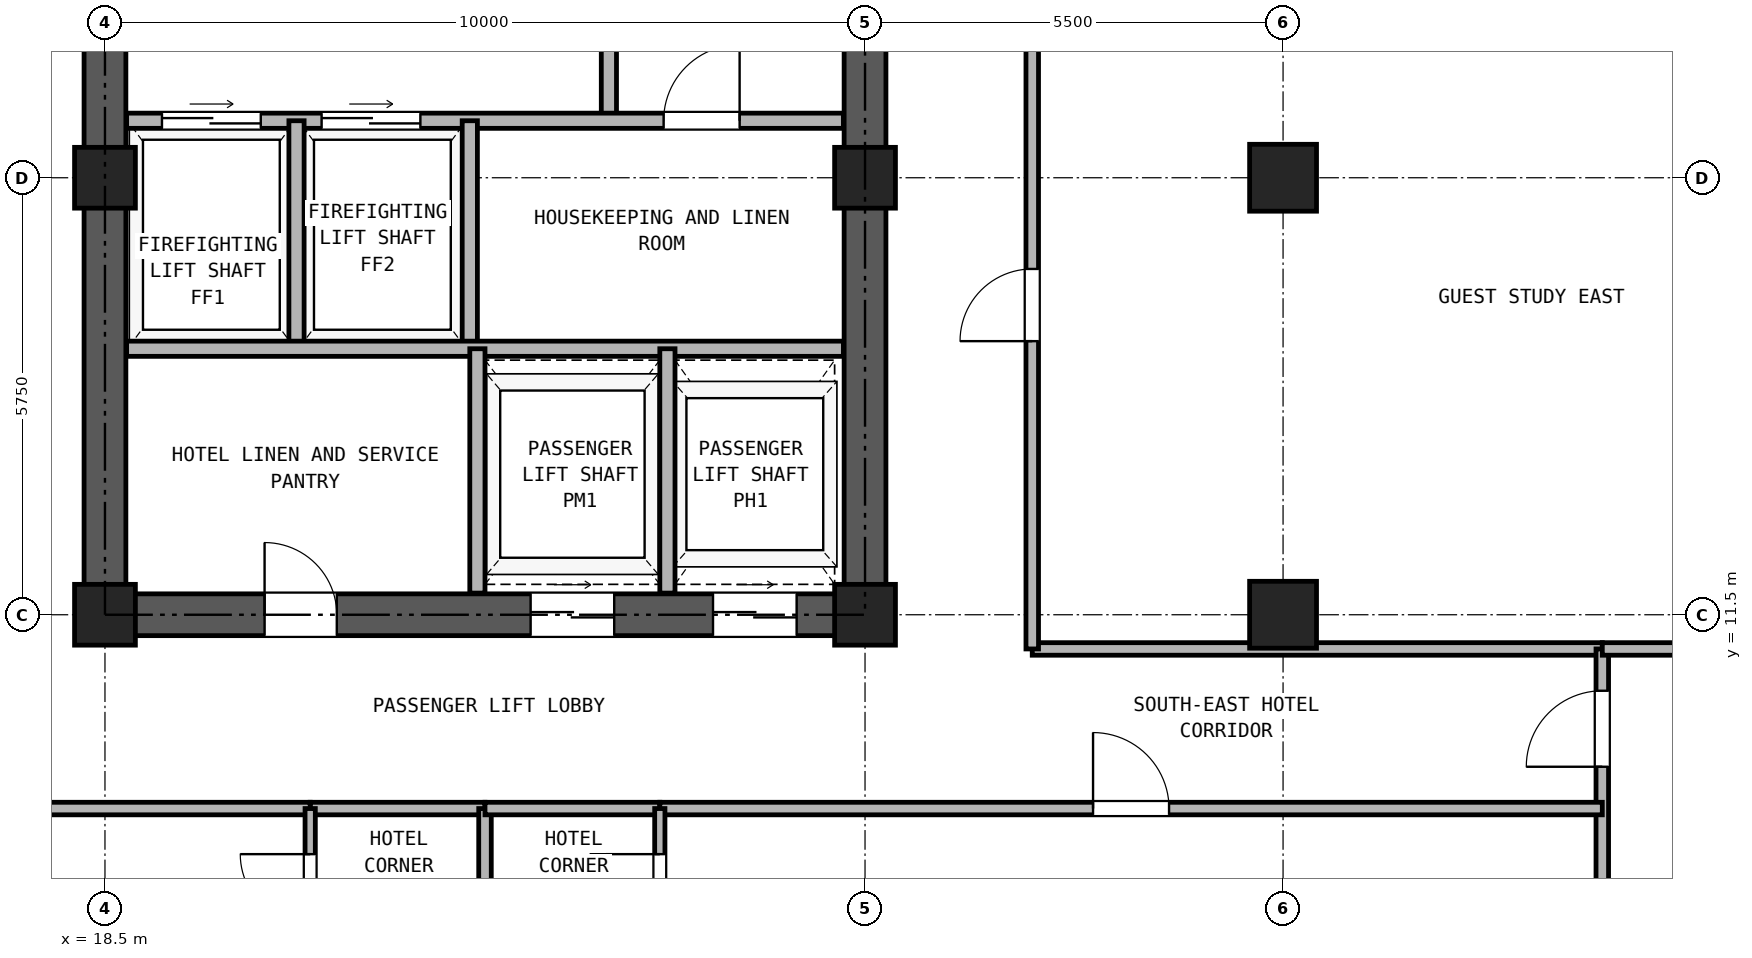
"""IFC4 building model, lengths in metres.
Left out: names, types, materials, properties, quantities, classifications, styles, units other than length and angle.
Written with IfcOpenShell. Run it as: python <this file> out.ifc"""

import sys

from ifc_helpers import new_model, si_unit, direction, frame, frame_2d, origin, origin_2d, place, context, subcontext, project, spatial, rectangle, hollow_rectangle, extrude, source, transform, mapped, element, fill, save


model = new_model("IFC4")
c1 = context("Model", 3, precision=1e-05, world=origin(), true_north=direction((0.0, 1.0)))
c2 = subcontext(c1, "Body", "Model", "MODEL_VIEW")
j1 = project(units=[si_unit("LENGTHUNIT", "METRE"), si_unit("PLANEANGLEUNIT", "RADIAN")], contexts=[c1])
p1 = place(None, origin())
s1 = spatial("IfcSite", under=j1, at=p1, CompositionType="ELEMENT")
p2 = place(p1, origin())
s2 = spatial("IfcBuilding", under=s1, at=p2, CompositionType="ELEMENT")
p3 = place(p2, frame((0.0, 0.0, 137.5)))
s3 = spatial("IfcBuildingStorey", under=s2, at=p3, CompositionType="ELEMENT", Elevation=137.5)
m1 = source(origin(), c2, "Body", "SweptSolid", [
    extrude(hollow_rectangle(XDim=0.8, YDim=0.8, WallThickness=0.045, at=origin_2d()), origin(), (0.0, 0.0, 1.0), 2.95),
])
for number, where, z_axis, x_axis in (
    (1, (18.5, 11.5, 0.0), (0.0, 0.0, 1.0), (1.0, 0.0, 0.0)),
    (2, (18.5, 17.25, 0.0), (0.0, 0.0, 1.0), (1.0, 0.0, 0.0)),
    (3, (28.5, 11.5, 0.0), (0.0, 0.0, 1.0), (1.0, 0.0, 0.0)),
    (4, (28.5, 17.25, 0.0), (0.0, 0.0, 1.0), (1.0, 0.0, 0.0)),
):
    element("IfcColumn", number, at=place(p3, frame(where, z_axis=z_axis, x_axis=x_axis)), inside=s3, PredefinedType="COLUMN", context=c2, shape_type="MappedRepresentation", body=[
        mapped(m1, transform((0.0, 0.0, 0.0), x_axis=(1.0, 0.0, 0.0), y_axis=(0.0, 1.0, 0.0), z_axis=(0.0, 0.0, 1.0), scale=1.0)),
    ])
m2 = source(origin(), c2, "Body", "SweptSolid", [
    extrude(hollow_rectangle(XDim=0.88, YDim=0.88, WallThickness=0.05, at=origin_2d()), origin(), (0.0, 0.0, 1.0), 2.95),
])
for number, where, z_axis, x_axis in (
    (5, (34.0, 11.5, 0.0), (0.0, 0.0, 1.0), (1.0, 0.0, 0.0)),
    (6, (34.0, 17.25, 0.0), (0.0, 0.0, 1.0), (1.0, 0.0, 0.0)),
):
    element("IfcColumn", number, at=place(p3, frame(where, z_axis=z_axis, x_axis=x_axis)), inside=s3, PredefinedType="COLUMN", context=c2, shape_type="MappedRepresentation", body=[
        mapped(m2, transform((0.0, 0.0, 0.0), x_axis=(1.0, 0.0, 0.0), y_axis=(0.0, 1.0, 0.0), z_axis=(0.0, 0.0, 1.0), scale=1.0)),
    ])
p4 = place(p3, frame((18.225, 11.5, 0.0), z_axis=(0.0, 0.0, 1.0), x_axis=(1.0, 0.0, 0.0)))
e7 = element("IfcWall", 7, at=p4, inside=s3, PredefinedType="SHEAR", context=c2, shape_type="SweptSolid", body=[
    extrude(rectangle(XDim=10.55, YDim=0.55, at=frame_2d((5.275, 0.0))), origin(), (0.0, 0.0, 1.0), 2.95),
])
p5 = place(p4, frame((2.375, 0.0, 0.0)))
e8 = element("IfcOpeningElement", 8, at=p5, cuts=e7, PredefinedType="OPENING", context=c2, shape_type="SweptSolid", body=[
    extrude(rectangle(XDim=0.95, YDim=2.15, at=frame_2d((0.475, 1.075))), frame((0.0, 0.285, 0.0), z_axis=(0.0, -1.0, 0.0), x_axis=(1.0, 0.0, 0.0)), (0.0, 0.0, 1.0), 0.57),
])
p6 = place(p4, frame((5.875, 0.0, 0.0)))
e9 = element("IfcOpeningElement", 9, at=p6, cuts=e7, PredefinedType="OPENING", context=c2, shape_type="SweptSolid", body=[
    extrude(rectangle(XDim=1.1, YDim=2.25, at=frame_2d((0.55, 1.125))), frame((0.0, 0.285, 0.0), z_axis=(0.0, -1.0, 0.0), x_axis=(1.0, 0.0, 0.0)), (0.0, 0.0, 1.0), 0.57),
])
p7 = place(p4, frame((8.275, 0.0, 0.0)))
e10 = element("IfcOpeningElement", 10, at=p7, cuts=e7, PredefinedType="OPENING", context=c2, shape_type="SweptSolid", body=[
    extrude(rectangle(XDim=1.1, YDim=2.25, at=frame_2d((0.55, 1.125))), frame((0.0, 0.285, 0.0), z_axis=(0.0, -1.0, 0.0), x_axis=(1.0, 0.0, 0.0)), (0.0, 0.0, 1.0), 0.57),
])
p8 = place(p3, frame((18.5, 11.775, 0.0), z_axis=(0.0, 0.0, 1.0), x_axis=(0.0, 1.0, 0.0)))
e11 = element("IfcWall", 11, at=p8, inside=s3, PredefinedType="SHEAR", context=c2, shape_type="SweptSolid", body=[
    extrude(rectangle(XDim=16.7, YDim=0.55, at=frame_2d((8.35, 0.0))), origin(), (0.0, 0.0, 1.0), 2.95),
])
p9 = place(p8, frame((7.375, 0.0, 0.0)))
e12 = element("IfcOpeningElement", 12, at=p9, cuts=e11, PredefinedType="OPENING", context=c2, shape_type="SweptSolid", body=[
    extrude(rectangle(XDim=1.15, YDim=2.2, at=frame_2d((0.575, 1.1))), frame((0.0, 0.285, 0.0), z_axis=(0.0, -1.0, 0.0), x_axis=(1.0, 0.0, 0.0)), (0.0, 0.0, 1.0), 0.57),
])
p10 = place(p3, frame((28.5, 11.775, 0.0), z_axis=(0.0, 0.0, 1.0), x_axis=(0.0, 1.0, 0.0)))
e13 = element("IfcWall", 13, at=p10, inside=s3, PredefinedType="SHEAR", context=c2, shape_type="SweptSolid", body=[
    extrude(rectangle(XDim=16.7, YDim=0.55, at=frame_2d((8.35, 0.0))), origin(), (0.0, 0.0, 1.0), 2.95),
])
p11 = place(p10, frame((7.375, 0.0, 0.0)))
e14 = element("IfcOpeningElement", 14, at=p11, cuts=e13, PredefinedType="OPENING", context=c2, shape_type="SweptSolid", body=[
    extrude(rectangle(XDim=1.15, YDim=2.2, at=frame_2d((0.575, 1.1))), frame((0.0, 0.285, 0.0), z_axis=(0.0, -1.0, 0.0), x_axis=(1.0, 0.0, 0.0)), (0.0, 0.0, 1.0), 0.57),
])
p12 = place(p3, frame((25.13, 18.0, 0.0), z_axis=(0.0, 0.0, 1.0), x_axis=(0.0, 1.0, 0.0)))
e15 = element("IfcWall", 15, at=p12, inside=s3, PredefinedType="PARTITIONING", context=c2, shape_type="SweptSolid", body=[
    extrude(rectangle(XDim=3.39, YDim=0.2, at=frame_2d((1.695, 0.0))), origin(), (0.0, 0.0, 1.0), 2.95),
])
p13 = place(p12, frame((1.1, 0.0, 0.0)))
e16 = element("IfcOpeningElement", 16, at=p13, cuts=e15, PredefinedType="OPENING", context=c2, shape_type="SweptSolid", body=[
    extrude(rectangle(XDim=1.15, YDim=2.2, at=frame_2d((0.575, 1.1))), frame((0.0, 0.11, 0.0), z_axis=(0.0, -1.0, 0.0), x_axis=(1.0, 0.0, 0.0)), (0.0, 0.0, 1.0), 0.22),
])
p14 = place(p3, frame((18.785, 18.0, 0.0), z_axis=(0.0, 0.0, 1.0), x_axis=(1.0, 0.0, 0.0)))
e17 = element("IfcWall", 17, at=p14, inside=s3, PredefinedType="PARTITIONING", context=c2, shape_type="SweptSolid", body=[
    extrude(rectangle(XDim=9.43, YDim=0.2, at=frame_2d((4.715, 0.0))), origin(), (0.0, 0.0, 1.0), 2.95),
])
p15 = place(p14, frame((0.465, 0.0, 0.0)))
e18 = element("IfcOpeningElement", 18, at=p15, cuts=e17, PredefinedType="OPENING", context=c2, shape_type="SweptSolid", body=[
    extrude(rectangle(XDim=1.3, YDim=2.3, at=frame_2d((0.65, 1.15))), frame((0.0, 0.11, 0.0), z_axis=(0.0, -1.0, 0.0), x_axis=(1.0, 0.0, 0.0)), (0.0, 0.0, 1.0), 0.22),
])
p16 = place(p14, frame((2.565, 0.0, 0.0)))
e19 = element("IfcOpeningElement", 19, at=p16, cuts=e17, PredefinedType="OPENING", context=c2, shape_type="SweptSolid", body=[
    extrude(rectangle(XDim=1.3, YDim=2.3, at=frame_2d((0.65, 1.15))), frame((0.0, 0.11, 0.0), z_axis=(0.0, -1.0, 0.0), x_axis=(1.0, 0.0, 0.0)), (0.0, 0.0, 1.0), 0.22),
])
p17 = place(p14, frame((7.065, 0.0, 0.0)))
e20 = element("IfcOpeningElement", 20, at=p17, cuts=e17, PredefinedType="OPENING", context=c2, shape_type="SweptSolid", body=[
    extrude(rectangle(XDim=1.0, YDim=2.15, at=frame_2d((0.5, 1.075))), frame((0.0, 0.11, 0.0), z_axis=(0.0, -1.0, 0.0), x_axis=(1.0, 0.0, 0.0)), (0.0, 0.0, 1.0), 0.22),
])
for number, where, z_axis, x_axis in (
    (21, (21.02, 15.0, 0.0), (0.0, 0.0, 1.0), (0.0, 1.0, 0.0)),
    (22, (23.3, 15.0, 0.0), (0.0, 0.0, 1.0), (0.0, 1.0, 0.0)),
):
    element("IfcWall", number, at=place(p3, frame(where, z_axis=z_axis, x_axis=x_axis)), inside=s3, PredefinedType="PARTITIONING", context=c2, shape_type="SweptSolid", body=[
        extrude(rectangle(XDim=3.0, YDim=0.2, at=frame_2d((1.5, 0.0))), origin(), (0.0, 0.0, 1.0), 2.95),
    ])
p18 = place(p3, frame((18.785, 15.0, 0.0), z_axis=(0.0, 0.0, 1.0), x_axis=(1.0, 0.0, 0.0)))
e23 = element("IfcWall", 23, at=p18, inside=s3, PredefinedType="PARTITIONING", context=c2, shape_type="SweptSolid", body=[
    extrude(rectangle(XDim=9.43, YDim=0.2, at=frame_2d((4.715, 0.0))), origin(), (0.0, 0.0, 1.0), 2.95),
])
for number, where, z_axis, x_axis in (
    (24, (23.4, 11.785, 0.0), (0.0, 0.0, 1.0), (0.0, 1.0, 0.0)),
    (25, (25.9, 11.785, 0.0), (0.0, 0.0, 1.0), (0.0, 1.0, 0.0)),
):
    element("IfcWall", number, at=place(p3, frame(where, z_axis=z_axis, x_axis=x_axis)), inside=s3, PredefinedType="PARTITIONING", context=c2, shape_type="SweptSolid", body=[
        extrude(rectangle(XDim=3.215, YDim=0.2, at=frame_2d((1.607, 0.0))), origin(), (0.0, 0.0, 1.0), 2.95),
    ])
p19 = place(p3, frame((30.7, 11.05, 0.0), z_axis=(0.0, 0.0, 1.0), x_axis=(1.0, 0.0, 0.0)))
e26 = element("IfcWall", 26, at=p19, inside=s3, PredefinedType="PARTITIONING", context=c2, shape_type="SweptSolid", body=[
    extrude(rectangle(XDim=7.5, YDim=0.165, at=frame_2d((3.75, 0.0))), origin(), (0.0, 0.0, 1.0), 2.95),
])
p20 = place(p3, frame((30.7, 11.05, 0.0), z_axis=(0.0, 0.0, 1.0), x_axis=(0.0, 1.0, 0.0)))
e27 = element("IfcWall", 27, at=p20, inside=s3, PredefinedType="PARTITIONING", context=c2, shape_type="SweptSolid", body=[
    extrude(rectangle(XDim=18.2, YDim=0.165, at=frame_2d((9.1, 0.0))), origin(), (0.0, 0.0, 1.0), 2.95),
])
p21 = place(p20, frame((4.05, 0.0, 0.0)))
e28 = element("IfcOpeningElement", 28, at=p21, cuts=e27, PredefinedType="OPENING", context=c2, shape_type="SweptSolid", body=[
    extrude(rectangle(XDim=0.95, YDim=2.15, at=frame_2d((0.475, 1.075))), frame((0.0, 0.093, 0.0), z_axis=(0.0, -1.0, 0.0), x_axis=(1.0, 0.0, 0.0)), (0.0, 0.0, 1.0), 0.185),
])
p22 = place(p20, frame((13.15, 0.0, 0.0)))
e29 = element("IfcOpeningElement", 29, at=p22, cuts=e27, PredefinedType="OPENING", context=c2, shape_type="SweptSolid", body=[
    extrude(rectangle(XDim=0.95, YDim=2.15, at=frame_2d((0.475, 1.075))), frame((0.0, 0.093, 0.0), z_axis=(0.0, -1.0, 0.0), x_axis=(1.0, 0.0, 0.0)), (0.0, 0.0, 1.0), 0.185),
])
p23 = place(p3, frame((38.2, 0.16, 0.0), z_axis=(0.0, 0.0, 1.0), x_axis=(0.0, 1.0, 0.0)))
e30 = element("IfcWall", 30, at=p23, inside=s3, PredefinedType="PARTITIONING", context=c2, shape_type="SweptSolid", body=[
    extrude(rectangle(XDim=10.89, YDim=0.165, at=frame_2d((5.445, 0.0))), origin(), (0.0, 0.0, 1.0), 2.95),
])
p24 = place(p23, frame((9.34, 0.0, 0.0)))
e31 = element("IfcOpeningElement", 31, at=p24, cuts=e30, PredefinedType="OPENING", context=c2, shape_type="SweptSolid", body=[
    extrude(rectangle(XDim=1.0, YDim=2.15, at=frame_2d((0.5, 1.075))), frame((0.0, 0.093, 0.0), z_axis=(0.0, -1.0, 0.0), x_axis=(1.0, 0.0, 0.0)), (0.0, 0.0, 1.0), 0.185),
])
p25 = place(p3, frame((38.2, 11.05, 0.0), z_axis=(0.0, 0.0, 1.0), x_axis=(1.0, 0.0, 0.0)))
e32 = element("IfcWall", 32, at=p25, inside=s3, PredefinedType="PARTITIONING", context=c2, shape_type="SweptSolid", body=[
    extrude(rectangle(XDim=8.64, YDim=0.165, at=frame_2d((4.32, 0.0))), origin(), (0.0, 0.0, 1.0), 2.95),
])
p26 = place(p3, frame((21.2, 8.95, 0.0), z_axis=(0.0, 0.0, 1.0), x_axis=(1.0, 0.0, 0.0)))
e33 = element("IfcWall", 33, at=p26, inside=s3, PredefinedType="PARTITIONING", context=c2, shape_type="SweptSolid", body=[
    extrude(rectangle(XDim=2.3, YDim=0.165, at=frame_2d((1.15, 0.0))), origin(), (0.0, 0.0, 1.0), 2.95),
])
p27 = place(p3, frame((8.8, 8.95, 0.0), z_axis=(0.0, 0.0, 1.0), x_axis=(1.0, 0.0, 0.0)))
e34 = element("IfcWall", 34, at=p27, inside=s3, PredefinedType="PARTITIONING", context=c2, shape_type="SweptSolid", body=[
    extrude(rectangle(XDim=12.4, YDim=0.165, at=frame_2d((6.2, 0.0))), origin(), (0.0, 0.0, 1.0), 2.95),
])
p28 = place(p27, frame((5.7, 0.0, 0.0)))
e35 = element("IfcOpeningElement", 35, at=p28, cuts=e34, PredefinedType="OPENING", context=c2, shape_type="SweptSolid", body=[
    extrude(rectangle(XDim=1.0, YDim=2.15, at=frame_2d((0.5, 1.075))), frame((0.0, 0.093, 0.0), z_axis=(0.0, -1.0, 0.0), x_axis=(1.0, 0.0, 0.0)), (0.0, 0.0, 1.0), 0.185),
])
p29 = place(p3, frame((21.2, 6.85, 0.0), z_axis=(0.0, 0.0, 1.0), x_axis=(0.0, 1.0, 0.0)))
e36 = element("IfcWall", 36, at=p29, inside=s3, PredefinedType="PARTITIONING", context=c2, shape_type="SweptSolid", body=[
    extrude(rectangle(XDim=2.1, YDim=0.135, at=frame_2d((1.05, 0.0))), origin(), (0.0, 0.0, 1.0), 2.95),
])
p30 = place(p29, frame((0.58, 0.0, 0.0)))
e37 = element("IfcOpeningElement", 37, at=p30, cuts=e36, PredefinedType="OPENING", context=c2, shape_type="SweptSolid", body=[
    extrude(rectangle(XDim=0.92, YDim=2.1, at=frame_2d((0.46, 1.05))), frame((0.0, 0.077, 0.0), z_axis=(0.0, -1.0, 0.0), x_axis=(1.0, 0.0, 0.0)), (0.0, 0.0, 1.0), 0.155),
])
p31 = place(p3, frame((23.5, 0.16, 0.0), z_axis=(0.0, 0.0, 1.0), x_axis=(0.0, 1.0, 0.0)))
e38 = element("IfcWall", 38, at=p31, inside=s3, PredefinedType="PARTITIONING", context=c2, shape_type="SweptSolid", body=[
    extrude(rectangle(XDim=8.79, YDim=0.165, at=frame_2d((4.395, 0.0))), origin(), (0.0, 0.0, 1.0), 2.95),
])
p32 = place(p3, frame((23.5, 8.95, 0.0), z_axis=(0.0, 0.0, 1.0), x_axis=(1.0, 0.0, 0.0)))
e39 = element("IfcWall", 39, at=p32, inside=s3, PredefinedType="PARTITIONING", context=c2, shape_type="SweptSolid", body=[
    extrude(rectangle(XDim=2.3, YDim=0.165, at=frame_2d((1.15, 0.0))), origin(), (0.0, 0.0, 1.0), 2.95),
])
p33 = place(p3, frame((25.8, 8.95, 0.0), z_axis=(0.0, 0.0, 1.0), x_axis=(1.0, 0.0, 0.0)))
e40 = element("IfcWall", 40, at=p33, inside=s3, PredefinedType="PARTITIONING", context=c2, shape_type="SweptSolid", body=[
    extrude(rectangle(XDim=12.4, YDim=0.165, at=frame_2d((6.2, 0.0))), origin(), (0.0, 0.0, 1.0), 2.95),
])
p34 = place(p33, frame((5.7, 0.0, 0.0)))
e41 = element("IfcOpeningElement", 41, at=p34, cuts=e40, PredefinedType="OPENING", context=c2, shape_type="SweptSolid", body=[
    extrude(rectangle(XDim=1.0, YDim=2.15, at=frame_2d((0.5, 1.075))), frame((0.0, 0.093, 0.0), z_axis=(0.0, -1.0, 0.0), x_axis=(1.0, 0.0, 0.0)), (0.0, 0.0, 1.0), 0.185),
])
p35 = place(p3, frame((25.8, 6.85, 0.0), z_axis=(0.0, 0.0, 1.0), x_axis=(0.0, 1.0, 0.0)))
e42 = element("IfcWall", 42, at=p35, inside=s3, PredefinedType="PARTITIONING", context=c2, shape_type="SweptSolid", body=[
    extrude(rectangle(XDim=2.1, YDim=0.135, at=frame_2d((1.05, 0.0))), origin(), (0.0, 0.0, 1.0), 2.95),
])
p36 = place(p35, frame((0.58, 0.0, 0.0)))
e43 = element("IfcOpeningElement", 43, at=p36, cuts=e42, PredefinedType="OPENING", context=c2, shape_type="SweptSolid", body=[
    extrude(rectangle(XDim=0.92, YDim=2.1, at=frame_2d((0.46, 1.05))), frame((0.0, 0.077, 0.0), z_axis=(0.0, -1.0, 0.0), x_axis=(1.0, 0.0, 0.0)), (0.0, 0.0, 1.0), 0.155),
])
p37 = place(p15, origin())
e44 = element("IfcDoor", 44, at=p37, inside=s3, OperationType="DOUBLE_DOOR_SLIDING", PredefinedType="DOOR", context=c2, shape_type="SweptSolid", body=[
    extrude(rectangle(XDim=1.3, YDim=2.3, at=frame_2d((0.65, 1.15))), frame((0.0, 0.025, 0.0), z_axis=(0.0, -1.0, 0.0), x_axis=(1.0, 0.0, 0.0)), (0.0, 0.0, 1.0), 0.05),
])
fill(e18, e44)
p38 = place(p16, origin())
e45 = element("IfcDoor", 45, at=p38, inside=s3, OperationType="DOUBLE_DOOR_SLIDING", PredefinedType="DOOR", context=c2, shape_type="SweptSolid", body=[
    extrude(rectangle(XDim=1.3, YDim=2.3, at=frame_2d((0.65, 1.15))), frame((0.0, 0.025, 0.0), z_axis=(0.0, -1.0, 0.0), x_axis=(1.0, 0.0, 0.0)), (0.0, 0.0, 1.0), 0.05),
])
fill(e19, e45)
p39 = place(p17, frame((1.0, 0.0, 0.0), z_axis=(0.0, 0.0, 1.0), x_axis=(-1.0, 0.0, 0.0)))
e46 = element("IfcDoor", 46, at=p39, inside=s3, OperationType="SINGLE_SWING_RIGHT", PredefinedType="DOOR", context=c2, shape_type="SweptSolid", body=[
    extrude(rectangle(XDim=1.0, YDim=2.15, at=frame_2d((0.5, 1.075))), frame((0.0, 0.025, 0.0), z_axis=(0.0, -1.0, 0.0), x_axis=(1.0, 0.0, 0.0)), (0.0, 0.0, 1.0), 0.05),
])
fill(e20, e46)
p40 = place(p5, frame((0.95, 0.0, 0.0), z_axis=(0.0, 0.0, 1.0), x_axis=(-1.0, 0.0, 0.0)))
e47 = element("IfcDoor", 47, at=p40, inside=s3, OperationType="SINGLE_SWING_LEFT", PredefinedType="DOOR", context=c2, shape_type="SweptSolid", body=[
    extrude(rectangle(XDim=0.95, YDim=2.15, at=frame_2d((0.475, 1.075))), frame((0.0, 0.025, 0.0), z_axis=(0.0, -1.0, 0.0), x_axis=(1.0, 0.0, 0.0)), (0.0, 0.0, 1.0), 0.05),
])
fill(e8, e47)
p41 = place(p6, frame((1.1, 0.0, 0.0), z_axis=(0.0, 0.0, 1.0), x_axis=(-1.0, 0.0, 0.0)))
e48 = element("IfcDoor", 48, at=p41, inside=s3, OperationType="DOUBLE_DOOR_SLIDING", PredefinedType="DOOR", context=c2, shape_type="SweptSolid", body=[
    extrude(rectangle(XDim=1.1, YDim=2.25, at=frame_2d((0.55, 1.125))), frame((0.0, 0.025, 0.0), z_axis=(0.0, -1.0, 0.0), x_axis=(1.0, 0.0, 0.0)), (0.0, 0.0, 1.0), 0.05),
])
fill(e9, e48)
p42 = place(p7, frame((1.1, 0.0, 0.0), z_axis=(0.0, 0.0, 1.0), x_axis=(-1.0, 0.0, 0.0)))
e49 = element("IfcDoor", 49, at=p42, inside=s3, OperationType="DOUBLE_DOOR_SLIDING", PredefinedType="DOOR", context=c2, shape_type="SweptSolid", body=[
    extrude(rectangle(XDim=1.1, YDim=2.25, at=frame_2d((0.55, 1.125))), frame((0.0, 0.025, 0.0), z_axis=(0.0, -1.0, 0.0), x_axis=(1.0, 0.0, 0.0)), (0.0, 0.0, 1.0), 0.05),
])
fill(e10, e49)
p43 = place(p24, frame((1.0, 0.0, 0.0), z_axis=(0.0, 0.0, 1.0), x_axis=(-1.0, 0.0, 0.0)))
e50 = element("IfcDoor", 50, at=p43, inside=s3, OperationType="SINGLE_SWING_LEFT", PredefinedType="DOOR", context=c2, shape_type="SweptSolid", body=[
    extrude(rectangle(XDim=1.0, YDim=2.15, at=frame_2d((0.5, 1.075))), frame((0.0, 0.025, 0.0), z_axis=(0.0, -1.0, 0.0), x_axis=(1.0, 0.0, 0.0)), (0.0, 0.0, 1.0), 0.05),
])
fill(e31, e50)
p44 = place(p30, origin())
e51 = element("IfcDoor", 51, at=p44, inside=s3, OperationType="SINGLE_SWING_RIGHT", PredefinedType="DOOR", context=c2, shape_type="SweptSolid", body=[
    extrude(rectangle(XDim=0.92, YDim=2.1, at=frame_2d((0.46, 1.05))), frame((0.0, 0.025, 0.0), z_axis=(0.0, -1.0, 0.0), x_axis=(1.0, 0.0, 0.0)), (0.0, 0.0, 1.0), 0.05),
])
fill(e37, e51)
p45 = place(p36, frame((0.92, 0.0, 0.0), z_axis=(0.0, 0.0, 1.0), x_axis=(-1.0, 0.0, 0.0)))
e52 = element("IfcDoor", 52, at=p45, inside=s3, OperationType="SINGLE_SWING_RIGHT", PredefinedType="DOOR", context=c2, shape_type="SweptSolid", body=[
    extrude(rectangle(XDim=0.92, YDim=2.1, at=frame_2d((0.46, 1.05))), frame((0.0, 0.025, 0.0), z_axis=(0.0, -1.0, 0.0), x_axis=(1.0, 0.0, 0.0)), (0.0, 0.0, 1.0), 0.05),
])
fill(e43, e52)
p46 = place(p34, frame((1.0, 0.0, 0.0), z_axis=(0.0, 0.0, 1.0), x_axis=(-1.0, 0.0, 0.0)))
e53 = element("IfcDoor", 53, at=p46, inside=s3, OperationType="SINGLE_SWING_LEFT", PredefinedType="DOOR", context=c2, shape_type="SweptSolid", body=[
    extrude(rectangle(XDim=1.0, YDim=2.15, at=frame_2d((0.5, 1.075))), frame((0.0, 0.025, 0.0), z_axis=(0.0, -1.0, 0.0), x_axis=(1.0, 0.0, 0.0)), (0.0, 0.0, 1.0), 0.05),
])
fill(e41, e53)
p47 = place(p21, origin())
e54 = element("IfcDoor", 54, at=p47, inside=s3, OperationType="SINGLE_SWING_LEFT", PredefinedType="DOOR", context=c2, shape_type="SweptSolid", body=[
    extrude(rectangle(XDim=0.95, YDim=2.15, at=frame_2d((0.475, 1.075))), frame((0.0, 0.025, 0.0), z_axis=(0.0, -1.0, 0.0), x_axis=(1.0, 0.0, 0.0)), (0.0, 0.0, 1.0), 0.05),
])
fill(e28, e54)
save(model, sys.argv[1])
